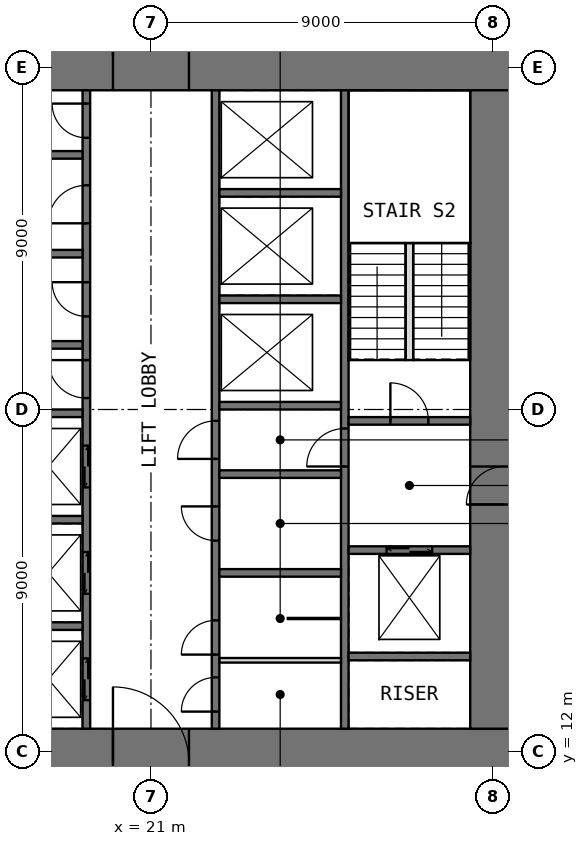
"""IFC4 building model, lengths in metres.
Left out: names, types, materials, properties, quantities, classifications, styles, units other than length and angle.
Written with IfcOpenShell. Run it as: python <this file> out.ifc"""

import sys

from ifc_helpers import new_model, si_unit, direction, frame, frame_2d, origin, place, context, subcontext, project, spatial, rectangle, extrude, element, fill, save


model = new_model("IFC4")
c1 = context("Model", 3, precision=1e-05, world=origin(), true_north=direction((0.0, 1.0)))
c2 = subcontext(c1, "Body", "Model", "MODEL_VIEW")
j1 = project(units=[si_unit("LENGTHUNIT", "METRE"), si_unit("PLANEANGLEUNIT", "RADIAN")], contexts=[c1])
p1 = place(None, origin())
s1 = spatial("IfcSite", under=j1, at=p1, CompositionType="ELEMENT")
p2 = place(p1, origin())
s2 = spatial("IfcBuilding", under=s1, at=p2, CompositionType="ELEMENT")
p3 = place(p2, frame((0.0, 0.0, 50.5)))
s3 = spatial("IfcBuildingStorey", under=s2, at=p3, CompositionType="ELEMENT", Elevation=50.5)
p4 = place(p3, frame((10.8, 11.7, -0.05), z_axis=(0.0, 0.0, 1.0), x_axis=(1.0, 0.0, 0.0)))
e1 = element("IfcWall", 1, at=p4, inside=s3, PredefinedType="SHEAR", context=c2, shape_type="SweptSolid", body=[
    extrude(rectangle(XDim=20.4, YDim=1.8, at=frame_2d((10.2, 0.0))), origin(), (0.0, 0.0, 1.0), 4.0),
])
p5 = place(p4, frame((9.2, 0.0, 0.05)))
e2 = element("IfcOpeningElement", 2, at=p5, cuts=e1, PredefinedType="OPENING", context=c2, shape_type="SweptSolid", body=[
    extrude(rectangle(XDim=2.0, YDim=2.2, at=frame_2d((1.0, 1.1))), frame((0.0, 0.91, 0.0), z_axis=(0.0, -1.0, 0.0), x_axis=(1.0, 0.0, 0.0)), (0.0, 0.0, 1.0), 1.82),
])
p6 = place(p3, frame((10.8, 30.3, -0.05), z_axis=(0.0, 0.0, 1.0), x_axis=(1.0, 0.0, 0.0)))
e3 = element("IfcWall", 3, at=p6, inside=s3, PredefinedType="SHEAR", context=c2, shape_type="SweptSolid", body=[
    extrude(rectangle(XDim=20.4, YDim=1.8, at=frame_2d((10.2, 0.0))), origin(), (0.0, 0.0, 1.0), 4.0),
])
p7 = place(p6, frame((9.2, 0.0, 0.05)))
e4 = element("IfcOpeningElement", 4, at=p7, cuts=e3, PredefinedType="OPENING", context=c2, shape_type="SweptSolid", body=[
    extrude(rectangle(XDim=2.0, YDim=2.2, at=frame_2d((1.0, 1.1))), frame((0.0, 0.91, 0.0), z_axis=(0.0, -1.0, 0.0), x_axis=(1.0, 0.0, 0.0)), (0.0, 0.0, 1.0), 1.82),
])
p8 = place(p3, frame((30.3, 12.6, -0.05), z_axis=(0.0, 0.0, 1.0), x_axis=(0.0, 1.0, 0.0)))
e5 = element("IfcWall", 5, at=p8, inside=s3, PredefinedType="SHEAR", context=c2, shape_type="SweptSolid", body=[
    extrude(rectangle(XDim=16.8, YDim=1.8, at=frame_2d((8.4, 0.0))), origin(), (0.0, 0.0, 1.0), 4.0),
])
p9 = place(p8, frame((5.9, 0.0, 0.05)))
e6 = element("IfcOpeningElement", 6, at=p9, cuts=e5, PredefinedType="OPENING", context=c2, shape_type="SweptSolid", body=[
    extrude(rectangle(XDim=1.0, YDim=2.2, at=frame_2d((0.5, 1.1))), frame((0.0, 0.91, 0.0), z_axis=(0.0, -1.0, 0.0), x_axis=(1.0, 0.0, 0.0)), (0.0, 0.0, 1.0), 1.82),
])
p10 = place(p3, frame((19.3, 12.6, -0.05), z_axis=(0.0, 0.0, 1.0), x_axis=(0.0, 1.0, 0.0)))
e7 = element("IfcWall", 7, at=p10, inside=s3, PredefinedType="SHEAR", context=c2, shape_type="SweptSolid", body=[
    extrude(rectangle(XDim=16.8, YDim=0.2, at=frame_2d((8.4, 0.0))), origin(), (0.0, 0.0, 1.0), 4.0),
])
p11 = place(p10, frame((8.7, 0.0, 0.05)))
e8 = element("IfcOpeningElement", 8, at=p11, cuts=e7, PredefinedType="OPENING", context=c2, shape_type="SweptSolid", body=[
    extrude(rectangle(XDim=1.0, YDim=2.2, at=frame_2d((0.5, 1.1))), frame((0.0, 0.11, 0.0), z_axis=(0.0, -1.0, 0.0), x_axis=(1.0, 0.0, 0.0)), (0.0, 0.0, 1.0), 0.22),
])
p12 = place(p10, frame((10.85, 0.0, 0.05)))
e9 = element("IfcOpeningElement", 9, at=p12, cuts=e7, PredefinedType="OPENING", context=c2, shape_type="SweptSolid", body=[
    extrude(rectangle(XDim=0.9, YDim=2.2, at=frame_2d((0.45, 1.1))), frame((0.0, 0.11, 0.0), z_axis=(0.0, -1.0, 0.0), x_axis=(1.0, 0.0, 0.0)), (0.0, 0.0, 1.0), 0.22),
])
p13 = place(p10, frame((13.3, 0.0, 0.05)))
e10 = element("IfcOpeningElement", 10, at=p13, cuts=e7, PredefinedType="OPENING", context=c2, shape_type="SweptSolid", body=[
    extrude(rectangle(XDim=1.0, YDim=2.2, at=frame_2d((0.5, 1.1))), frame((0.0, 0.11, 0.0), z_axis=(0.0, -1.0, 0.0), x_axis=(1.0, 0.0, 0.0)), (0.0, 0.0, 1.0), 0.22),
])
p14 = place(p10, frame((15.55, 0.0, 0.05)))
e11 = element("IfcOpeningElement", 11, at=p14, cuts=e7, PredefinedType="OPENING", context=c2, shape_type="SweptSolid", body=[
    extrude(rectangle(XDim=0.9, YDim=2.2, at=frame_2d((0.45, 1.1))), frame((0.0, 0.11, 0.0), z_axis=(0.0, -1.0, 0.0), x_axis=(1.0, 0.0, 0.0)), (0.0, 0.0, 1.0), 0.22),
])
p15 = place(p10, frame((0.75, 0.0, 0.05)))
e12 = element("IfcOpeningElement", 12, at=p15, cuts=e7, PredefinedType="OPENING", context=c2, shape_type="SweptSolid", body=[
    extrude(rectangle(XDim=1.1, YDim=2.2, at=frame_2d((0.55, 1.1))), frame((0.0, 0.11, 0.0), z_axis=(0.0, -1.0, 0.0), x_axis=(1.0, 0.0, 0.0)), (0.0, 0.0, 1.0), 0.22),
])
p16 = place(p10, frame((3.55, 0.0, 0.05)))
e13 = element("IfcOpeningElement", 13, at=p16, cuts=e7, PredefinedType="OPENING", context=c2, shape_type="SweptSolid", body=[
    extrude(rectangle(XDim=1.1, YDim=2.2, at=frame_2d((0.55, 1.1))), frame((0.0, 0.11, 0.0), z_axis=(0.0, -1.0, 0.0), x_axis=(1.0, 0.0, 0.0)), (0.0, 0.0, 1.0), 0.22),
])
p17 = place(p10, frame((6.35, 0.0, 0.05)))
e14 = element("IfcOpeningElement", 14, at=p17, cuts=e7, PredefinedType="OPENING", context=c2, shape_type="SweptSolid", body=[
    extrude(rectangle(XDim=1.1, YDim=2.2, at=frame_2d((0.55, 1.1))), frame((0.0, 0.11, 0.0), z_axis=(0.0, -1.0, 0.0), x_axis=(1.0, 0.0, 0.0)), (0.0, 0.0, 1.0), 0.22),
])
p18 = place(p3, frame((22.7, 12.6, -0.05), z_axis=(0.0, 0.0, 1.0), x_axis=(0.0, 1.0, 0.0)))
e15 = element("IfcWall", 15, at=p18, inside=s3, PredefinedType="SHEAR", context=c2, shape_type="SweptSolid", body=[
    extrude(rectangle(XDim=16.8, YDim=0.2, at=frame_2d((8.4, 0.0))), origin(), (0.0, 0.0, 1.0), 4.0),
])
p19 = place(p18, frame((0.45, 0.0, 0.05)))
e16 = element("IfcOpeningElement", 16, at=p19, cuts=e15, PredefinedType="OPENING", context=c2, shape_type="SweptSolid", body=[
    extrude(rectangle(XDim=0.9, YDim=2.2, at=frame_2d((0.45, 1.1))), frame((0.0, 0.11, 0.0), z_axis=(0.0, -1.0, 0.0), x_axis=(1.0, 0.0, 0.0)), (0.0, 0.0, 1.0), 0.22),
])
p20 = place(p18, frame((7.1, 0.0, 0.05)))
e17 = element("IfcOpeningElement", 17, at=p20, cuts=e15, PredefinedType="OPENING", context=c2, shape_type="SweptSolid", body=[
    extrude(rectangle(XDim=1.0, YDim=2.2, at=frame_2d((0.5, 1.1))), frame((0.0, 0.11, 0.0), z_axis=(0.0, -1.0, 0.0), x_axis=(1.0, 0.0, 0.0)), (0.0, 0.0, 1.0), 0.22),
])
p21 = place(p18, frame((1.95, 0.0, 0.05)))
e18 = element("IfcOpeningElement", 18, at=p21, cuts=e15, PredefinedType="OPENING", context=c2, shape_type="SweptSolid", body=[
    extrude(rectangle(XDim=0.9, YDim=2.2, at=frame_2d((0.45, 1.1))), frame((0.0, 0.11, 0.0), z_axis=(0.0, -1.0, 0.0), x_axis=(1.0, 0.0, 0.0)), (0.0, 0.0, 1.0), 0.22),
])
p22 = place(p18, frame((4.95, 0.0, 0.05)))
e19 = element("IfcOpeningElement", 19, at=p22, cuts=e15, PredefinedType="OPENING", context=c2, shape_type="SweptSolid", body=[
    extrude(rectangle(XDim=0.9, YDim=2.2, at=frame_2d((0.45, 1.1))), frame((0.0, 0.11, 0.0), z_axis=(0.0, -1.0, 0.0), x_axis=(1.0, 0.0, 0.0)), (0.0, 0.0, 1.0), 0.22),
])
p23 = place(p3, frame((26.1, 12.6, -0.05), z_axis=(0.0, 0.0, 1.0), x_axis=(0.0, 1.0, 0.0)))
e20 = element("IfcWall", 20, at=p23, inside=s3, PredefinedType="SHEAR", context=c2, shape_type="SweptSolid", body=[
    extrude(rectangle(XDim=16.8, YDim=0.2, at=frame_2d((8.4, 0.0))), origin(), (0.0, 0.0, 1.0), 4.0),
])
p24 = place(p23, frame((6.9, 0.0, 0.05)))
e21 = element("IfcOpeningElement", 21, at=p24, cuts=e20, PredefinedType="OPENING", context=c2, shape_type="SweptSolid", body=[
    extrude(rectangle(XDim=1.0, YDim=2.2, at=frame_2d((0.5, 1.1))), frame((0.0, 0.11, 0.0), z_axis=(0.0, -1.0, 0.0), x_axis=(1.0, 0.0, 0.0)), (0.0, 0.0, 1.0), 0.22),
])
for number, where, z_axis, x_axis in (
    (22, (16.0, 15.3, -0.05), (0.0, 0.0, 1.0), (1.0, 0.0, 0.0)),
    (23, (16.0, 18.1, -0.05), (0.0, 0.0, 1.0), (1.0, 0.0, 0.0)),
    (24, (16.0, 20.9, -0.05), (0.0, 0.0, 1.0), (1.0, 0.0, 0.0)),
    (25, (16.0, 22.7, -0.05), (0.0, 0.0, 1.0), (1.0, 0.0, 0.0)),
    (26, (16.0, 25.1, -0.05), (0.0, 0.0, 1.0), (1.0, 0.0, 0.0)),
    (27, (16.0, 27.7, -0.05), (0.0, 0.0, 1.0), (1.0, 0.0, 0.0)),
    (28, (22.8, 16.7, -0.05), (0.0, 0.0, 1.0), (1.0, 0.0, 0.0)),
    (29, (22.8, 19.3, -0.05), (0.0, 0.0, 1.0), (1.0, 0.0, 0.0)),
    (30, (22.8, 21.1, -0.05), (0.0, 0.0, 1.0), (1.0, 0.0, 0.0)),
    (31, (22.8, 23.9, -0.05), (0.0, 0.0, 1.0), (1.0, 0.0, 0.0)),
    (32, (22.8, 26.7, -0.05), (0.0, 0.0, 1.0), (1.0, 0.0, 0.0)),
    (33, (26.2, 14.5, -0.05), (0.0, 0.0, 1.0), (1.0, 0.0, 0.0)),
):
    element("IfcWall", number, at=place(p3, frame(where, z_axis=z_axis, x_axis=x_axis)), inside=s3, PredefinedType="SHEAR", context=c2, shape_type="SweptSolid", body=[
        extrude(rectangle(XDim=3.2, YDim=0.2, at=frame_2d((1.6, 0.0))), origin(), (0.0, 0.0, 1.0), 4.0),
    ])
p25 = place(p3, frame((26.2, 17.3, -0.05), z_axis=(0.0, 0.0, 1.0), x_axis=(1.0, 0.0, 0.0)))
e34 = element("IfcWall", 34, at=p25, inside=s3, PredefinedType="SHEAR", context=c2, shape_type="SweptSolid", body=[
    extrude(rectangle(XDim=3.2, YDim=0.2, at=frame_2d((1.6, 0.0))), origin(), (0.0, 0.0, 1.0), 4.0),
])
p26 = place(p25, frame((1.0, 0.0, 0.05)))
e35 = element("IfcOpeningElement", 35, at=p26, cuts=e34, PredefinedType="OPENING", context=c2, shape_type="SweptSolid", body=[
    extrude(rectangle(XDim=1.2, YDim=2.2, at=frame_2d((0.6, 1.1))), frame((0.0, 0.11, 0.0), z_axis=(0.0, -1.0, 0.0), x_axis=(1.0, 0.0, 0.0)), (0.0, 0.0, 1.0), 0.22),
])
p27 = place(p3, frame((26.2, 20.7, -0.05), z_axis=(0.0, 0.0, 1.0), x_axis=(1.0, 0.0, 0.0)))
e36 = element("IfcWall", 36, at=p27, inside=s3, PredefinedType="SHEAR", context=c2, shape_type="SweptSolid", body=[
    extrude(rectangle(XDim=3.2, YDim=0.2, at=frame_2d((1.6, 0.0))), origin(), (0.0, 0.0, 1.0), 4.0),
])
p28 = place(p27, frame((1.1, 0.0, 0.05)))
e37 = element("IfcOpeningElement", 37, at=p28, cuts=e36, PredefinedType="OPENING", context=c2, shape_type="SweptSolid", body=[
    extrude(rectangle(XDim=1.0, YDim=2.2, at=frame_2d((0.5, 1.1))), frame((0.0, 0.11, 0.0), z_axis=(0.0, -1.0, 0.0), x_axis=(1.0, 0.0, 0.0)), (0.0, 0.0, 1.0), 0.22),
])
p29 = place(p3, frame((22.8, 14.4, 0.0), z_axis=(0.0, 0.0, 1.0), x_axis=(1.0, 0.0, 0.0)))
e38 = element("IfcWall", 38, at=p29, inside=s3, PredefinedType="PARTITIONING", context=c2, shape_type="SweptSolid", body=[
    extrude(rectangle(XDim=3.2, YDim=0.12, at=frame_2d((1.6, 0.0))), origin(), (0.0, 0.0, 1.0), 3.75),
])
p30 = place(p3, frame((24.6, 15.5, 0.0), z_axis=(0.0, 0.0, 1.0), x_axis=(1.0, 0.0, 0.0)))
e39 = element("IfcWall", 39, at=p30, inside=s3, PredefinedType="PARTITIONING", context=c2, shape_type="SweptSolid", body=[
    extrude(rectangle(XDim=1.4, YDim=0.03, at=frame_2d((0.7, 0.0))), origin(), (0.0, 0.0, 1.0), 3.75),
])
p31 = place(p3, frame((27.8, 22.3, 0.0), z_axis=(0.0, 0.0, 1.0), x_axis=(0.0, 1.0, 0.0)))
e40 = element("IfcWall", 40, at=p31, inside=s3, PredefinedType="PARTITIONING", context=c2, shape_type="SweptSolid", body=[
    extrude(rectangle(XDim=3.08, YDim=0.2, at=frame_2d((1.54, 0.0))), origin(), (0.0, 0.0, 1.0), 4.0),
])
p32 = place(p5, origin())
e41 = element("IfcDoor", 41, at=p32, inside=s3, OperationType="DOUBLE_DOOR_SINGLE_SWING", PredefinedType="DOOR", context=c2, shape_type="SweptSolid", body=[
    extrude(rectangle(XDim=2.0, YDim=2.2, at=frame_2d((1.0, 1.1))), frame((0.0, 0.025, 0.0), z_axis=(0.0, -1.0, 0.0), x_axis=(1.0, 0.0, 0.0)), (0.0, 0.0, 1.0), 0.05),
])
fill(e2, e41)
p33 = place(p7, origin())
e42 = element("IfcDoor", 42, at=p33, inside=s3, OperationType="DOUBLE_DOOR_SINGLE_SWING", PredefinedType="DOOR", context=c2, shape_type="SweptSolid", body=[
    extrude(rectangle(XDim=2.0, YDim=2.2, at=frame_2d((1.0, 1.1))), frame((0.0, 0.025, 0.0), z_axis=(0.0, -1.0, 0.0), x_axis=(1.0, 0.0, 0.0)), (0.0, 0.0, 1.0), 0.05),
])
fill(e4, e42)
p34 = place(p19, origin())
e43 = element("IfcDoor", 43, at=p34, inside=s3, OperationType="SINGLE_SWING_LEFT", PredefinedType="DOOR", context=c2, shape_type="SweptSolid", body=[
    extrude(rectangle(XDim=0.9, YDim=2.2, at=frame_2d((0.45, 1.1))), frame((0.0, 0.025, 0.0), z_axis=(0.0, -1.0, 0.0), x_axis=(1.0, 0.0, 0.0)), (0.0, 0.0, 1.0), 0.05),
])
fill(e16, e43)
p35 = place(p9, origin())
e44 = element("IfcDoor", 44, at=p35, inside=s3, OperationType="SINGLE_SWING_LEFT", PredefinedType="DOOR", context=c2, shape_type="SweptSolid", body=[
    extrude(rectangle(XDim=1.0, YDim=2.2, at=frame_2d((0.5, 1.1))), frame((0.0, 0.025, 0.0), z_axis=(0.0, -1.0, 0.0), x_axis=(1.0, 0.0, 0.0)), (0.0, 0.0, 1.0), 0.05),
])
fill(e6, e44)
p36 = place(p28, origin())
e45 = element("IfcDoor", 45, at=p36, inside=s3, OperationType="SINGLE_SWING_LEFT", PredefinedType="DOOR", context=c2, shape_type="SweptSolid", body=[
    extrude(rectangle(XDim=1.0, YDim=2.2, at=frame_2d((0.5, 1.1))), frame((0.0, 0.025, 0.0), z_axis=(0.0, -1.0, 0.0), x_axis=(1.0, 0.0, 0.0)), (0.0, 0.0, 1.0), 0.05),
])
fill(e37, e45)
p37 = place(p24, origin())
e46 = element("IfcDoor", 46, at=p37, inside=s3, OperationType="SINGLE_SWING_LEFT", PredefinedType="DOOR", context=c2, shape_type="SweptSolid", body=[
    extrude(rectangle(XDim=1.0, YDim=2.2, at=frame_2d((0.5, 1.1))), frame((0.0, 0.025, 0.0), z_axis=(0.0, -1.0, 0.0), x_axis=(1.0, 0.0, 0.0)), (0.0, 0.0, 1.0), 0.05),
])
fill(e21, e46)
p38 = place(p11, origin())
e47 = element("IfcDoor", 47, at=p38, inside=s3, OperationType="SINGLE_SWING_RIGHT", PredefinedType="DOOR", context=c2, shape_type="SweptSolid", body=[
    extrude(rectangle(XDim=1.0, YDim=2.2, at=frame_2d((0.5, 1.1))), frame((0.0, 0.025, 0.0), z_axis=(0.0, -1.0, 0.0), x_axis=(1.0, 0.0, 0.0)), (0.0, 0.0, 1.0), 0.05),
])
fill(e8, e47)
p39 = place(p20, origin())
e48 = element("IfcDoor", 48, at=p39, inside=s3, OperationType="SINGLE_SWING_LEFT", PredefinedType="DOOR", context=c2, shape_type="SweptSolid", body=[
    extrude(rectangle(XDim=1.0, YDim=2.2, at=frame_2d((0.5, 1.1))), frame((0.0, 0.025, 0.0), z_axis=(0.0, -1.0, 0.0), x_axis=(1.0, 0.0, 0.0)), (0.0, 0.0, 1.0), 0.05),
])
fill(e17, e48)
p40 = place(p12, origin())
e49 = element("IfcDoor", 49, at=p40, inside=s3, OperationType="SINGLE_SWING_RIGHT", PredefinedType="DOOR", context=c2, shape_type="SweptSolid", body=[
    extrude(rectangle(XDim=0.9, YDim=2.2, at=frame_2d((0.45, 1.1))), frame((0.0, 0.025, 0.0), z_axis=(0.0, -1.0, 0.0), x_axis=(1.0, 0.0, 0.0)), (0.0, 0.0, 1.0), 0.05),
])
fill(e9, e49)
p41 = place(p13, origin())
e50 = element("IfcDoor", 50, at=p41, inside=s3, OperationType="SINGLE_SWING_LEFT", PredefinedType="DOOR", context=c2, shape_type="SweptSolid", body=[
    extrude(rectangle(XDim=1.0, YDim=2.2, at=frame_2d((0.5, 1.1))), frame((0.0, 0.025, 0.0), z_axis=(0.0, -1.0, 0.0), x_axis=(1.0, 0.0, 0.0)), (0.0, 0.0, 1.0), 0.05),
])
fill(e10, e50)
p42 = place(p14, origin())
e51 = element("IfcDoor", 51, at=p42, inside=s3, OperationType="SINGLE_SWING_RIGHT", PredefinedType="DOOR", context=c2, shape_type="SweptSolid", body=[
    extrude(rectangle(XDim=0.9, YDim=2.2, at=frame_2d((0.45, 1.1))), frame((0.0, 0.025, 0.0), z_axis=(0.0, -1.0, 0.0), x_axis=(1.0, 0.0, 0.0)), (0.0, 0.0, 1.0), 0.05),
])
fill(e11, e51)
p43 = place(p21, origin())
e52 = element("IfcDoor", 52, at=p43, inside=s3, OperationType="SINGLE_SWING_LEFT", PredefinedType="DOOR", context=c2, shape_type="SweptSolid", body=[
    extrude(rectangle(XDim=0.9, YDim=2.2, at=frame_2d((0.45, 1.1))), frame((0.0, 0.025, 0.0), z_axis=(0.0, -1.0, 0.0), x_axis=(1.0, 0.0, 0.0)), (0.0, 0.0, 1.0), 0.05),
])
fill(e18, e52)
p44 = place(p22, origin())
e53 = element("IfcDoor", 53, at=p44, inside=s3, OperationType="SINGLE_SWING_RIGHT", PredefinedType="DOOR", context=c2, shape_type="SweptSolid", body=[
    extrude(rectangle(XDim=0.9, YDim=2.2, at=frame_2d((0.45, 1.1))), frame((0.0, 0.025, 0.0), z_axis=(0.0, -1.0, 0.0), x_axis=(1.0, 0.0, 0.0)), (0.0, 0.0, 1.0), 0.05),
])
fill(e19, e53)
p45 = place(p15, origin())
e54 = element("IfcDoor", 54, at=p45, inside=s3, OperationType="DOUBLE_DOOR_SLIDING", PredefinedType="DOOR", context=c2, shape_type="SweptSolid", body=[
    extrude(rectangle(XDim=1.1, YDim=2.2, at=frame_2d((0.55, 1.1))), frame((0.0, 0.025, 0.0), z_axis=(0.0, -1.0, 0.0), x_axis=(1.0, 0.0, 0.0)), (0.0, 0.0, 1.0), 0.05),
])
fill(e12, e54)
p46 = place(p16, origin())
e55 = element("IfcDoor", 55, at=p46, inside=s3, OperationType="DOUBLE_DOOR_SLIDING", PredefinedType="DOOR", context=c2, shape_type="SweptSolid", body=[
    extrude(rectangle(XDim=1.1, YDim=2.2, at=frame_2d((0.55, 1.1))), frame((0.0, 0.025, 0.0), z_axis=(0.0, -1.0, 0.0), x_axis=(1.0, 0.0, 0.0)), (0.0, 0.0, 1.0), 0.05),
])
fill(e13, e55)
p47 = place(p17, origin())
e56 = element("IfcDoor", 56, at=p47, inside=s3, OperationType="DOUBLE_DOOR_SLIDING", PredefinedType="DOOR", context=c2, shape_type="SweptSolid", body=[
    extrude(rectangle(XDim=1.1, YDim=2.2, at=frame_2d((0.55, 1.1))), frame((0.0, 0.025, 0.0), z_axis=(0.0, -1.0, 0.0), x_axis=(1.0, 0.0, 0.0)), (0.0, 0.0, 1.0), 0.05),
])
fill(e14, e56)
p48 = place(p26, origin())
e57 = element("IfcDoor", 57, at=p48, inside=s3, OperationType="DOUBLE_DOOR_SLIDING", PredefinedType="DOOR", context=c2, shape_type="SweptSolid", body=[
    extrude(rectangle(XDim=1.2, YDim=2.2, at=frame_2d((0.6, 1.1))), frame((0.0, 0.025, 0.0), z_axis=(0.0, -1.0, 0.0), x_axis=(1.0, 0.0, 0.0)), (0.0, 0.0, 1.0), 0.05),
])
fill(e35, e57)
save(model, sys.argv[1])
